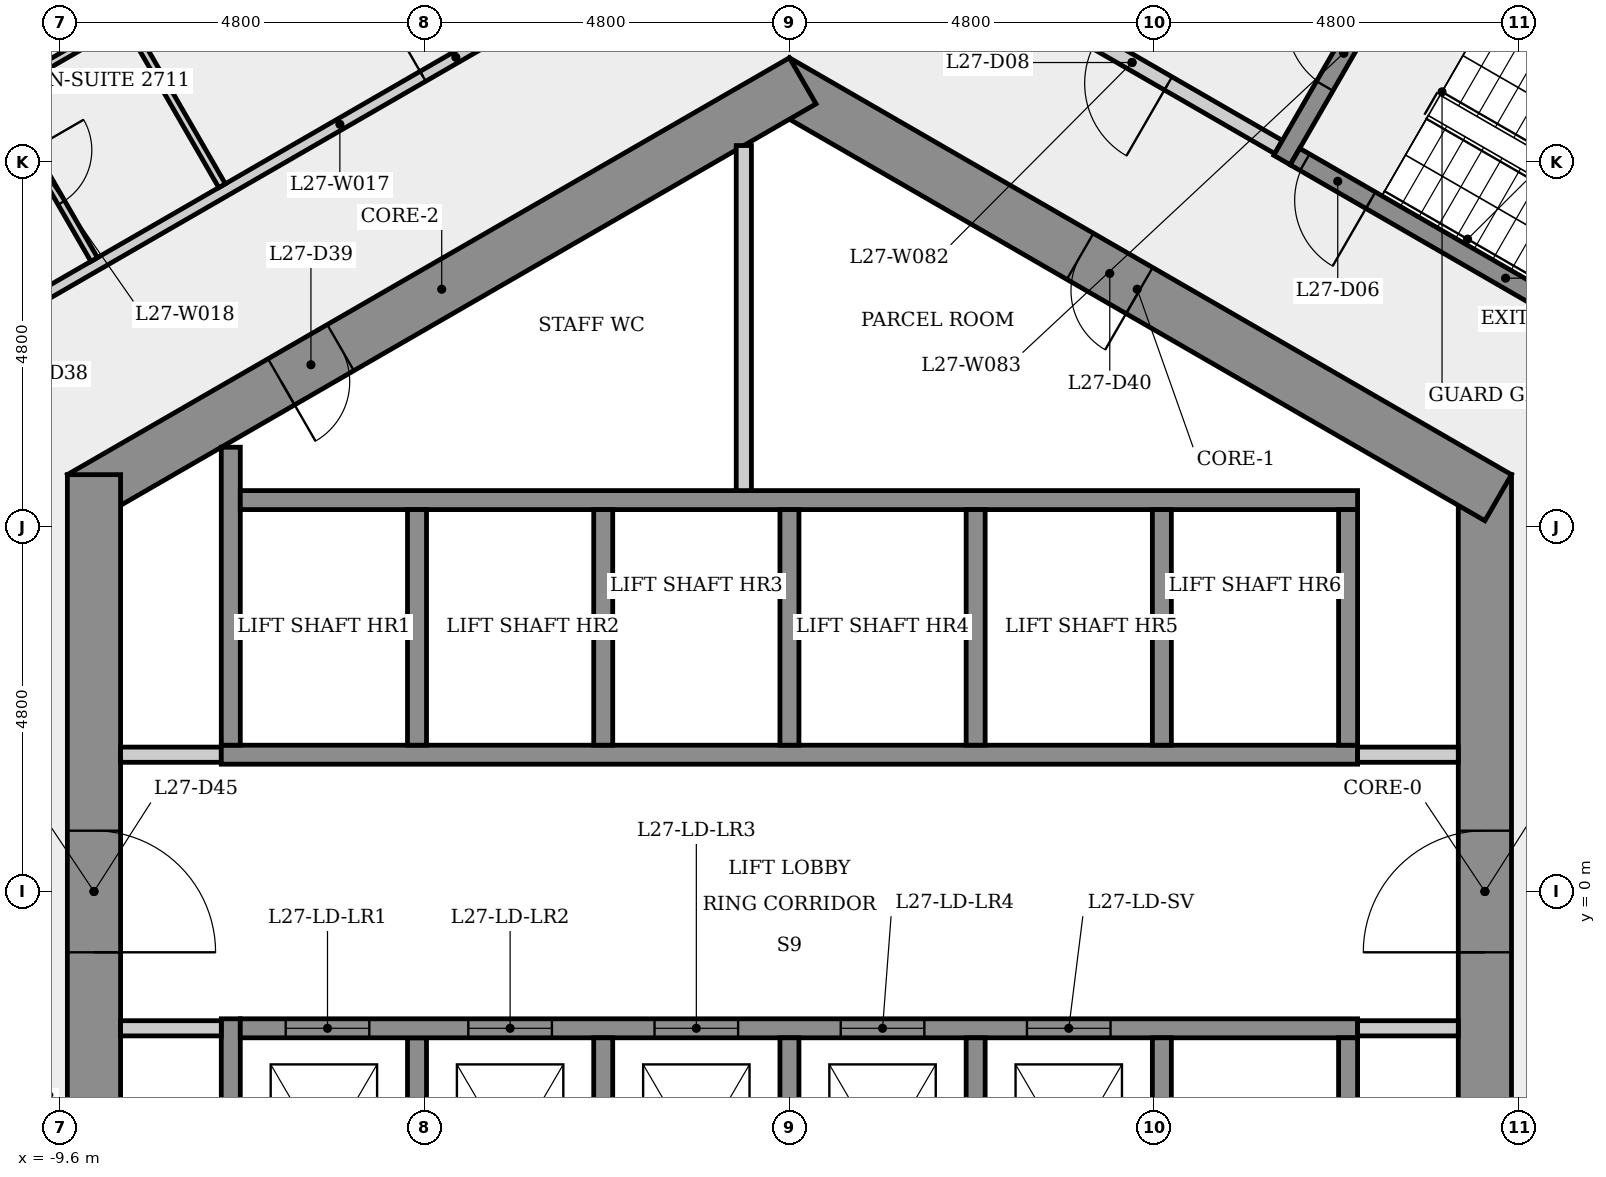
"""IFC4 building model, lengths in metres.
Left out: names, types, materials, properties, quantities, classifications, styles, units other than length and angle.
Written with IfcOpenShell. Run it as: python <this file> out.ifc"""

import sys

from ifc_helpers import new_model, si_unit, direction, frame, frame_2d, origin, place, context, subcontext, project, spatial, rectangle, extrude, element, fill, save


model = new_model("IFC4")
c1 = context("Model", 3, precision=1e-05, world=origin(), true_north=direction((0.0, 1.0)))
c2 = subcontext(c1, "Body", "Model", "MODEL_VIEW")
j1 = project(units=[si_unit("LENGTHUNIT", "METRE"), si_unit("PLANEANGLEUNIT", "RADIAN")], contexts=[c1])
p1 = place(None, origin())
s1 = spatial("IfcSite", under=j1, at=p1, CompositionType="ELEMENT")
p2 = place(p1, origin())
s2 = spatial("IfcBuilding", under=s1, at=p2, CompositionType="ELEMENT")
p3 = place(p2, frame((0.0, 0.0, 103.5)))
s3 = spatial("IfcBuildingStorey", under=s2, at=p3, CompositionType="ELEMENT", Elevation=103.5)
p4 = place(p3, frame((9.15, -5.485, 0.0), z_axis=(0.0, 0.0, 1.0), x_axis=(0.0, 1.0, 0.0)))
e1 = element("IfcWall", 1, at=p4, inside=s3, PredefinedType="SHEAR", context=c2, shape_type="SweptSolid", body=[
    extrude(rectangle(XDim=10.97, YDim=0.7, at=frame_2d((5.485, 0.0))), origin(), (0.0, 0.0, 1.0), 3.4),
])
p5 = place(p4, frame((4.685, 0.0, 0.0)))
e2 = element("IfcOpeningElement", 2, at=p5, cuts=e1, PredefinedType="OPENING", context=c2, shape_type="SweptSolid", body=[
    extrude(rectangle(XDim=1.6, YDim=2.1, at=frame_2d((0.8, 1.05))), frame((0.0, 0.36, 0.0), z_axis=(0.0, -1.0, 0.0), x_axis=(1.0, 0.0, 0.0)), (0.0, 0.0, 1.0), 0.72),
])
p6 = place(p3, frame((9.325, 5.182, 0.0), z_axis=(0.0, 0.0, 1.0), x_axis=(-0.866023993627, 0.500002442456, 0.0)))
e3 = element("IfcWall", 3, at=p6, inside=s3, PredefinedType="SHEAR", context=c2, shape_type="SweptSolid", body=[
    extrude(rectangle(XDim=10.97, YDim=0.7, at=frame_2d((5.485, 0.0))), origin(), (0.0, 0.0, 1.0), 3.4),
])
p7 = place(p6, frame((5.451, 0.0, 0.0)))
e4 = element("IfcOpeningElement", 4, at=p7, cuts=e3, PredefinedType="OPENING", context=c2, shape_type="SweptSolid", body=[
    extrude(rectangle(XDim=0.9, YDim=2.1, at=frame_2d((0.45, 1.05))), frame((0.0, 0.36, 0.0), z_axis=(0.0, -1.0, 0.0), x_axis=(1.0, 0.0, 0.0)), (0.0, 0.0, 1.0), 0.72),
])
p8 = place(p3, frame((0.175, 10.667, 0.0), z_axis=(0.0, 0.0, 1.0), x_axis=(-0.866023993627, -0.500002442456, 0.0)))
e5 = element("IfcWall", 5, at=p8, inside=s3, PredefinedType="SHEAR", context=c2, shape_type="SweptSolid", body=[
    extrude(rectangle(XDim=10.97, YDim=0.7, at=frame_2d((5.485, 0.0))), origin(), (0.0, 0.0, 1.0), 3.4),
])
p9 = place(p8, frame((7.021, 0.0, 0.0)))
e6 = element("IfcOpeningElement", 6, at=p9, cuts=e5, PredefinedType="OPENING", context=c2, shape_type="SweptSolid", body=[
    extrude(rectangle(XDim=0.9, YDim=2.1, at=frame_2d((0.45, 1.05))), frame((0.0, 0.36, 0.0), z_axis=(0.0, -1.0, 0.0), x_axis=(1.0, 0.0, 0.0)), (0.0, 0.0, 1.0), 0.72),
])
p10 = place(p3, frame((-9.15, 5.485, 0.0), z_axis=(0.0, 0.0, 1.0), x_axis=(0.0, -1.0, 0.0)))
e7 = element("IfcWall", 7, at=p10, inside=s3, PredefinedType="SHEAR", context=c2, shape_type="SweptSolid", body=[
    extrude(rectangle(XDim=10.97, YDim=0.7, at=frame_2d((5.485, 0.0))), origin(), (0.0, 0.0, 1.0), 3.4),
])
p11 = place(p10, frame((4.685, 0.0, 0.0)))
e8 = element("IfcOpeningElement", 8, at=p11, cuts=e7, PredefinedType="OPENING", context=c2, shape_type="SweptSolid", body=[
    extrude(rectangle(XDim=1.6, YDim=2.1, at=frame_2d((0.8, 1.05))), frame((0.0, 0.36, 0.0), z_axis=(0.0, -1.0, 0.0), x_axis=(1.0, 0.0, 0.0)), (0.0, 0.0, 1.0), 0.72),
])
p12 = place(p3, frame((-10.517, 7.438, 0.0), z_axis=(0.0, 0.0, 1.0), x_axis=(0.866032192358, 0.499988241661, 0.0)))
e9 = element("IfcWall", 9, at=p12, inside=s3, PredefinedType="PARTITIONING", context=c2, shape_type="SweptSolid", body=[
    extrude(rectangle(XDim=10.628, YDim=0.15, at=frame_2d((5.314, 0.0))), origin(), (0.0, 0.0, 1.0), 3.05),
])
p13 = place(p12, frame((6.575, 0.0, 0.0)))
e10 = element("IfcOpeningElement", 10, at=p13, cuts=e9, PredefinedType="OPENING", context=c2, shape_type="SweptSolid", body=[
    extrude(rectangle(XDim=1.0, YDim=2.1, at=frame_2d((0.5, 1.05))), frame((0.0, 0.085, 0.0), z_axis=(0.0, -1.0, 0.0), x_axis=(1.0, 0.0, 0.0)), (0.0, 0.0, 1.0), 0.17),
])
p14 = place(p3, frame((-10.435, 10.545, 0.0), z_axis=(0.0, 0.0, 1.0), x_axis=(0.500034319456, -0.866005588531, 0.0)))
e11 = element("IfcWall", 11, at=p14, inside=s3, PredefinedType="PARTITIONING", context=c2, shape_type="SweptSolid", body=[
    extrude(rectangle(XDim=2.575, YDim=0.1, at=frame_2d((1.288, 0.0))), origin(), (0.0, 0.0, 1.0), 3.05),
])
p15 = place(p14, frame((0.913, 0.0, 0.0)))
e12 = element("IfcOpeningElement", 12, at=p15, cuts=e11, PredefinedType="OPENING", context=c2, shape_type="SweptSolid", body=[
    extrude(rectangle(XDim=0.8, YDim=2.1, at=frame_2d((0.4, 1.05))), frame((0.0, 0.06, 0.0), z_axis=(0.0, -1.0, 0.0), x_axis=(1.0, 0.0, 0.0)), (0.0, 0.0, 1.0), 0.12),
])
p16 = place(p3, frame((-8.8, 1.8, 0.0), z_axis=(0.0, 0.0, 1.0), x_axis=(1.0, 0.0, 0.0)))
e13 = element("IfcWall", 13, at=p16, inside=s3, PredefinedType="PARTITIONING", context=c2, shape_type="SweptSolid", body=[
    extrude(rectangle(XDim=1.325, YDim=0.2, at=frame_2d((0.663, 0.0))), origin(), (0.0, 0.0, 1.0), 3.05),
])
p17 = place(p3, frame((-8.771, 11.448, 0.0), z_axis=(0.0, 0.0, 1.0), x_axis=(-0.866033360935, -0.499986217557, 0.0)))
e14 = element("IfcWall", 14, at=p17, inside=s3, PredefinedType="PARTITIONING", context=c2, shape_type="SweptSolid", body=[
    extrude(rectangle(XDim=1.843, YDim=0.1, at=frame_2d((0.921, 0.0))), origin(), (0.0, 0.0, 1.0), 3.05),
])
p18 = place(p3, frame((-11.32, 15.964, 0.0), z_axis=(0.0, 0.0, 1.0), x_axis=(0.499997453958, -0.866026873738, 0.0)))
e15 = element("IfcWall", 15, at=p18, inside=s3, PredefinedType="PARTITIONING", context=c2, shape_type="SweptSolid", body=[
    extrude(rectangle(XDim=7.71, YDim=0.1, at=frame_2d((3.855, 0.0))), origin(), (0.0, 0.0, 1.0), 3.05),
])
p19 = place(p3, frame((-7.475, 1.8, 0.0), z_axis=(0.0, 0.0, 1.0), x_axis=(1.0, 0.0, 0.0)))
e16 = element("IfcWall", 16, at=p19, inside=s3, PredefinedType="SHEAR", context=c2, shape_type="SweptSolid", body=[
    extrude(rectangle(XDim=14.95, YDim=0.25, at=frame_2d((7.475, 0.0))), origin(), (0.0, 0.0, 1.0), 3.05),
])
p20 = place(p3, frame((-7.35, -5.846, 0.0), z_axis=(0.0, 0.0, 1.0), x_axis=(0.0, 1.0, 0.0)))
e17 = element("IfcWall", 17, at=p20, inside=s3, PredefinedType="SHEAR", context=c2, shape_type="SweptSolid", body=[
    extrude(rectangle(XDim=4.171, YDim=0.25, at=frame_2d((2.085, 0.0))), origin(), (0.0, 0.0, 1.0), 3.05),
])
p21 = place(p3, frame((-7.35, 1.925, 0.0), z_axis=(0.0, 0.0, 1.0), x_axis=(0.0, 1.0, 0.0)))
e18 = element("IfcWall", 18, at=p21, inside=s3, PredefinedType="SHEAR", context=c2, shape_type="SweptSolid", body=[
    extrude(rectangle(XDim=3.921, YDim=0.25, at=frame_2d((1.96, 0.0))), origin(), (0.0, 0.0, 1.0), 3.05),
])
p22 = place(p3, frame((-7.225, 5.15, 0.0), z_axis=(0.0, 0.0, 1.0), x_axis=(1.0, 0.0, 0.0)))
e19 = element("IfcWall", 19, at=p22, inside=s3, PredefinedType="SHEAR", context=c2, shape_type="SweptSolid", body=[
    extrude(rectangle(XDim=14.7, YDim=0.25, at=frame_2d((7.35, 0.0))), origin(), (0.0, 0.0, 1.0), 3.05),
])
p23 = place(p3, frame((-7.475, -1.8, 0.0), z_axis=(0.0, 0.0, 1.0), x_axis=(-1.0, 0.0, 0.0)))
e20 = element("IfcWall", 20, at=p23, inside=s3, PredefinedType="PARTITIONING", context=c2, shape_type="SweptSolid", body=[
    extrude(rectangle(XDim=1.325, YDim=0.2, at=frame_2d((0.663, 0.0))), origin(), (0.0, 0.0, 1.0), 3.05),
])
for number, where, z_axis, x_axis in (
    (21, (-4.9, -1.925, 0.0), (0.0, 0.0, 1.0), (0.0, -1.0, 0.0)),
    (22, (-4.9, 5.025, 0.0), (0.0, 0.0, 1.0), (0.0, -1.0, 0.0)),
):
    element("IfcWall", number, at=place(p3, frame(where, z_axis=z_axis, x_axis=x_axis)), inside=s3, PredefinedType="SHEAR", context=c2, shape_type="SweptSolid", body=[
        extrude(rectangle(XDim=3.1, YDim=0.25, at=frame_2d((1.55, 0.0))), origin(), (0.0, 0.0, 1.0), 3.4),
    ])
p24 = place(p3, frame((-7.225, -1.8, 0.0), z_axis=(0.0, 0.0, 1.0), x_axis=(1.0, 0.0, 0.0)))
e23 = element("IfcWall", 23, at=p24, inside=s3, PredefinedType="SHEAR", context=c2, shape_type="SweptSolid", body=[
    extrude(rectangle(XDim=14.7, YDim=0.25, at=frame_2d((7.35, 0.0))), origin(), (0.0, 0.0, 1.0), 3.05),
])
p25 = place(p24, frame((0.597, 0.0, 0.0)))
e24 = element("IfcOpeningElement", 24, at=p25, cuts=e23, PredefinedType="OPENING", context=c2, shape_type="SweptSolid", body=[
    extrude(rectangle(XDim=1.1, YDim=2.1, at=frame_2d((0.55, 1.05))), frame((0.0, 0.135, 0.0), z_axis=(0.0, -1.0, 0.0), x_axis=(1.0, 0.0, 0.0)), (0.0, 0.0, 1.0), 0.27),
])
p26 = place(p24, frame((3.0, 0.0, 0.0)))
e25 = element("IfcOpeningElement", 25, at=p26, cuts=e23, PredefinedType="OPENING", context=c2, shape_type="SweptSolid", body=[
    extrude(rectangle(XDim=1.1, YDim=2.1, at=frame_2d((0.55, 1.05))), frame((0.0, 0.135, 0.0), z_axis=(0.0, -1.0, 0.0), x_axis=(1.0, 0.0, 0.0)), (0.0, 0.0, 1.0), 0.27),
])
p27 = place(p24, frame((5.45, 0.0, 0.0)))
e26 = element("IfcOpeningElement", 26, at=p27, cuts=e23, PredefinedType="OPENING", context=c2, shape_type="SweptSolid", body=[
    extrude(rectangle(XDim=1.1, YDim=2.1, at=frame_2d((0.55, 1.05))), frame((0.0, 0.135, 0.0), z_axis=(0.0, -1.0, 0.0), x_axis=(1.0, 0.0, 0.0)), (0.0, 0.0, 1.0), 0.27),
])
p28 = place(p24, frame((7.9, 0.0, 0.0)))
e27 = element("IfcOpeningElement", 27, at=p28, cuts=e23, PredefinedType="OPENING", context=c2, shape_type="SweptSolid", body=[
    extrude(rectangle(XDim=1.1, YDim=2.1, at=frame_2d((0.55, 1.05))), frame((0.0, 0.135, 0.0), z_axis=(0.0, -1.0, 0.0), x_axis=(1.0, 0.0, 0.0)), (0.0, 0.0, 1.0), 0.27),
])
p29 = place(p24, frame((10.35, 0.0, 0.0)))
e28 = element("IfcOpeningElement", 28, at=p29, cuts=e23, PredefinedType="OPENING", context=c2, shape_type="SweptSolid", body=[
    extrude(rectangle(XDim=1.1, YDim=2.1, at=frame_2d((0.55, 1.05))), frame((0.0, 0.135, 0.0), z_axis=(0.0, -1.0, 0.0), x_axis=(1.0, 0.0, 0.0)), (0.0, 0.0, 1.0), 0.27),
])
for number, where, z_axis, x_axis in (
    (29, (-2.45, -1.925, 0.0), (0.0, 0.0, 1.0), (0.0, -1.0, 0.0)),
    (30, (-2.45, 5.025, 0.0), (0.0, 0.0, 1.0), (0.0, -1.0, 0.0)),
):
    element("IfcWall", number, at=place(p3, frame(where, z_axis=z_axis, x_axis=x_axis)), inside=s3, PredefinedType="SHEAR", context=c2, shape_type="SweptSolid", body=[
        extrude(rectangle(XDim=3.1, YDim=0.25, at=frame_2d((1.55, 0.0))), origin(), (0.0, 0.0, 1.0), 3.4),
    ])
p30 = place(p3, frame((-0.6, 9.815, 0.0), z_axis=(0.0, 0.0, 1.0), x_axis=(0.0, -1.0, 0.0)))
e31 = element("IfcWall", 31, at=p30, inside=s3, PredefinedType="PARTITIONING", context=c2, shape_type="SweptSolid", body=[
    extrude(rectangle(XDim=4.54, YDim=0.2, at=frame_2d((2.27, 0.0))), origin(), (0.0, 0.0, 1.0), 3.05),
])
for number, where, z_axis, x_axis in (
    (32, (0.0, -1.925, 0.0), (0.0, 0.0, 1.0), (0.0, -1.0, 0.0)),
    (33, (0.0, 5.025, 0.0), (0.0, 0.0, 1.0), (0.0, -1.0, 0.0)),
    (34, (2.45, -1.925, 0.0), (0.0, 0.0, 1.0), (0.0, -1.0, 0.0)),
    (35, (2.45, 5.025, 0.0), (0.0, 0.0, 1.0), (0.0, -1.0, 0.0)),
    (36, (4.9, -1.925, 0.0), (0.0, 0.0, 1.0), (0.0, -1.0, 0.0)),
    (37, (4.9, 5.025, 0.0), (0.0, 0.0, 1.0), (0.0, -1.0, 0.0)),
):
    element("IfcWall", number, at=place(p3, frame(where, z_axis=z_axis, x_axis=x_axis)), inside=s3, PredefinedType="SHEAR", context=c2, shape_type="SweptSolid", body=[
        extrude(rectangle(XDim=3.1, YDim=0.25, at=frame_2d((1.55, 0.0))), origin(), (0.0, 0.0, 1.0), 3.4),
    ])
p31 = place(p3, frame((6.435, 9.795, 0.0), z_axis=(0.0, 0.0, 1.0), x_axis=(-0.866012907634, 0.500021643343, 0.0)))
e38 = element("IfcWall", 38, at=p31, inside=s3, PredefinedType="PARTITIONING", context=c2, shape_type="SweptSolid", body=[
    extrude(rectangle(XDim=4.45, YDim=0.2, at=frame_2d((2.225, 0.0))), origin(), (0.0, 0.0, 1.0), 3.05),
])
p32 = place(p31, frame((1.675, 0.0, 0.0)))
e39 = element("IfcOpeningElement", 39, at=p32, cuts=e38, PredefinedType="OPENING", context=c2, shape_type="SweptSolid", body=[
    extrude(rectangle(XDim=1.1, YDim=2.1, at=frame_2d((0.55, 1.05))), frame((0.0, 0.11, 0.0), z_axis=(0.0, -1.0, 0.0), x_axis=(1.0, 0.0, 0.0)), (0.0, 0.0, 1.0), 0.22),
])
p33 = place(p3, frame((6.48, 9.624, 0.0), z_axis=(0.0, 0.0, 1.0), x_axis=(0.500017246033, 0.866015446554, 0.0)))
e40 = element("IfcWall", 40, at=p33, inside=s3, PredefinedType="SHEAR", context=c2, shape_type="SweptSolid", body=[
    extrude(rectangle(XDim=3.25, YDim=0.25, at=frame_2d((1.625, 0.0))), origin(), (0.0, 0.0, 1.0), 3.05),
])
p34 = place(p33, frame((1.125, 0.0, 0.0)))
e41 = element("IfcOpeningElement", 41, at=p34, cuts=e40, PredefinedType="OPENING", context=c2, shape_type="SweptSolid", body=[
    extrude(rectangle(XDim=1.0, YDim=2.1, at=frame_2d((0.5, 1.05))), frame((0.0, 0.135, 0.0), z_axis=(0.0, -1.0, 0.0), x_axis=(1.0, 0.0, 0.0)), (0.0, 0.0, 1.0), 0.27),
])
p35 = place(p3, frame((7.475, 1.8, 0.0), z_axis=(0.0, 0.0, 1.0), x_axis=(1.0, 0.0, 0.0)))
e42 = element("IfcWall", 42, at=p35, inside=s3, PredefinedType="PARTITIONING", context=c2, shape_type="SweptSolid", body=[
    extrude(rectangle(XDim=1.325, YDim=0.2, at=frame_2d((0.663, 0.0))), origin(), (0.0, 0.0, 1.0), 3.05),
])
for number, where, z_axis, x_axis in (
    (43, (7.35, -1.925, 0.0), (0.0, 0.0, 1.0), (0.0, -1.0, 0.0)),
    (44, (7.35, 5.025, 0.0), (0.0, 0.0, 1.0), (0.0, -1.0, 0.0)),
):
    element("IfcWall", number, at=place(p3, frame(where, z_axis=z_axis, x_axis=x_axis)), inside=s3, PredefinedType="SHEAR", context=c2, shape_type="SweptSolid", body=[
        extrude(rectangle(XDim=3.1, YDim=0.25, at=frame_2d((1.55, 0.0))), origin(), (0.0, 0.0, 1.0), 3.4),
    ])
p36 = place(p3, frame((8.151, 12.268, 0.0), z_axis=(0.0, 0.0, 1.0), x_axis=(0.866025499775, -0.499999833739, 0.0)))
e45 = element("IfcWall", 45, at=p36, inside=s3, PredefinedType="SHEAR", context=c2, shape_type="SweptSolid", body=[
    extrude(rectangle(XDim=6.4, YDim=0.25, at=frame_2d((3.2, 0.0))), origin(), (0.0, 0.0, 1.0), 3.05),
])
p37 = place(p3, frame((8.8, -1.8, 0.0), z_axis=(0.0, 0.0, 1.0), x_axis=(-1.0, 0.0, 0.0)))
e46 = element("IfcWall", 46, at=p37, inside=s3, PredefinedType="PARTITIONING", context=c2, shape_type="SweptSolid", body=[
    extrude(rectangle(XDim=1.325, YDim=0.2, at=frame_2d((0.663, 0.0))), origin(), (0.0, 0.0, 1.0), 3.05),
])
p38 = place(p3, frame((12.194, 6.47, 0.0), z_axis=(0.0, 0.0, 1.0), x_axis=(-0.866025499775, 0.499999833739, 0.0)))
e47 = element("IfcWall", 47, at=p38, inside=s3, PredefinedType="SHEAR", context=c2, shape_type="SweptSolid", body=[
    extrude(rectangle(XDim=6.4, YDim=0.25, at=frame_2d((3.2, 0.0))), origin(), (0.0, 0.0, 1.0), 3.05),
])
p39 = place(p38, frame((5.25, 0.0, 0.0)))
e48 = element("IfcOpeningElement", 48, at=p39, cuts=e47, PredefinedType="OPENING", context=c2, shape_type="SweptSolid", body=[
    extrude(rectangle(XDim=1.0, YDim=2.1, at=frame_2d((0.5, 1.05))), frame((0.0, 0.135, 0.0), z_axis=(0.0, -1.0, 0.0), x_axis=(1.0, 0.0, 0.0)), (0.0, 0.0, 1.0), 0.27),
])
p40 = place(p25, origin())
e49 = element("IfcDoor", 49, at=p40, inside=s3, OperationType="SLIDING_TO_LEFT", PredefinedType="DOOR", context=c2, shape_type="SweptSolid", body=[
    extrude(rectangle(XDim=1.1, YDim=2.1, at=frame_2d((0.55, 1.05))), frame((0.0, 0.025, 0.0), z_axis=(0.0, -1.0, 0.0), x_axis=(1.0, 0.0, 0.0)), (0.0, 0.0, 1.0), 0.05),
])
fill(e24, e49)
p41 = place(p26, origin())
e50 = element("IfcDoor", 50, at=p41, inside=s3, OperationType="SLIDING_TO_LEFT", PredefinedType="DOOR", context=c2, shape_type="SweptSolid", body=[
    extrude(rectangle(XDim=1.1, YDim=2.1, at=frame_2d((0.55, 1.05))), frame((0.0, 0.025, 0.0), z_axis=(0.0, -1.0, 0.0), x_axis=(1.0, 0.0, 0.0)), (0.0, 0.0, 1.0), 0.05),
])
fill(e25, e50)
p42 = place(p27, origin())
e51 = element("IfcDoor", 51, at=p42, inside=s3, OperationType="SLIDING_TO_LEFT", PredefinedType="DOOR", context=c2, shape_type="SweptSolid", body=[
    extrude(rectangle(XDim=1.1, YDim=2.1, at=frame_2d((0.55, 1.05))), frame((0.0, 0.025, 0.0), z_axis=(0.0, -1.0, 0.0), x_axis=(1.0, 0.0, 0.0)), (0.0, 0.0, 1.0), 0.05),
])
fill(e26, e51)
p43 = place(p28, origin())
e52 = element("IfcDoor", 52, at=p43, inside=s3, OperationType="SLIDING_TO_LEFT", PredefinedType="DOOR", context=c2, shape_type="SweptSolid", body=[
    extrude(rectangle(XDim=1.1, YDim=2.1, at=frame_2d((0.55, 1.05))), frame((0.0, 0.025, 0.0), z_axis=(0.0, -1.0, 0.0), x_axis=(1.0, 0.0, 0.0)), (0.0, 0.0, 1.0), 0.05),
])
fill(e27, e52)
p44 = place(p29, origin())
e53 = element("IfcDoor", 53, at=p44, inside=s3, OperationType="SLIDING_TO_LEFT", PredefinedType="DOOR", context=c2, shape_type="SweptSolid", body=[
    extrude(rectangle(XDim=1.1, YDim=2.1, at=frame_2d((0.55, 1.05))), frame((0.0, 0.025, 0.0), z_axis=(0.0, -1.0, 0.0), x_axis=(1.0, 0.0, 0.0)), (0.0, 0.0, 1.0), 0.05),
])
fill(e28, e53)
p45 = place(p39, origin())
e54 = element("IfcDoor", 54, at=p45, inside=s3, OperationType="SINGLE_SWING_LEFT", PredefinedType="DOOR", context=c2, shape_type="SweptSolid", body=[
    extrude(rectangle(XDim=1.0, YDim=2.1, at=frame_2d((0.5, 1.05))), frame((0.0, 0.025, 0.0), z_axis=(0.0, -1.0, 0.0), x_axis=(1.0, 0.0, 0.0)), (0.0, 0.0, 1.0), 0.05),
])
fill(e48, e54)
p46 = place(p34, origin())
e55 = element("IfcDoor", 55, at=p46, inside=s3, OperationType="SINGLE_SWING_RIGHT", PredefinedType="DOOR", context=c2, shape_type="SweptSolid", body=[
    extrude(rectangle(XDim=1.0, YDim=2.1, at=frame_2d((0.5, 1.05))), frame((0.0, 0.025, 0.0), z_axis=(0.0, -1.0, 0.0), x_axis=(1.0, 0.0, 0.0)), (0.0, 0.0, 1.0), 0.05),
])
fill(e41, e55)
p47 = place(p32, origin())
e56 = element("IfcDoor", 56, at=p47, inside=s3, OperationType="SINGLE_SWING_LEFT", PredefinedType="DOOR", context=c2, shape_type="SweptSolid", body=[
    extrude(rectangle(XDim=1.1, YDim=2.1, at=frame_2d((0.55, 1.05))), frame((0.0, 0.025, 0.0), z_axis=(0.0, -1.0, 0.0), x_axis=(1.0, 0.0, 0.0)), (0.0, 0.0, 1.0), 0.05),
])
fill(e39, e56)
p48 = place(p13, origin())
e57 = element("IfcDoor", 57, at=p48, inside=s3, OperationType="SINGLE_SWING_LEFT", PredefinedType="DOOR", context=c2, shape_type="SweptSolid", body=[
    extrude(rectangle(XDim=1.0, YDim=2.1, at=frame_2d((0.5, 1.05))), frame((0.0, 0.025, 0.0), z_axis=(0.0, -1.0, 0.0), x_axis=(1.0, 0.0, 0.0)), (0.0, 0.0, 1.0), 0.05),
])
fill(e10, e57)
p49 = place(p15, origin())
e58 = element("IfcDoor", 58, at=p49, inside=s3, OperationType="SINGLE_SWING_LEFT", PredefinedType="DOOR", context=c2, shape_type="SweptSolid", body=[
    extrude(rectangle(XDim=0.8, YDim=2.1, at=frame_2d((0.4, 1.05))), frame((0.0, 0.025, 0.0), z_axis=(0.0, -1.0, 0.0), x_axis=(1.0, 0.0, 0.0)), (0.0, 0.0, 1.0), 0.05),
])
fill(e12, e58)
p50 = place(p9, origin())
e59 = element("IfcDoor", 59, at=p50, inside=s3, OperationType="SINGLE_SWING_RIGHT", PredefinedType="DOOR", context=c2, shape_type="SweptSolid", body=[
    extrude(rectangle(XDim=0.9, YDim=2.1, at=frame_2d((0.45, 1.05))), frame((0.0, 0.025, 0.0), z_axis=(0.0, -1.0, 0.0), x_axis=(1.0, 0.0, 0.0)), (0.0, 0.0, 1.0), 0.05),
])
fill(e6, e59)
p51 = place(p7, origin())
e60 = element("IfcDoor", 60, at=p51, inside=s3, OperationType="SINGLE_SWING_LEFT", PredefinedType="DOOR", context=c2, shape_type="SweptSolid", body=[
    extrude(rectangle(XDim=0.9, YDim=2.1, at=frame_2d((0.45, 1.05))), frame((0.0, 0.025, 0.0), z_axis=(0.0, -1.0, 0.0), x_axis=(1.0, 0.0, 0.0)), (0.0, 0.0, 1.0), 0.05),
])
fill(e4, e60)
p52 = place(p5, origin())
e61 = element("IfcDoor", 61, at=p52, inside=s3, OperationType="SINGLE_SWING_LEFT", PredefinedType="DOOR", context=c2, shape_type="SweptSolid", body=[
    extrude(rectangle(XDim=1.6, YDim=2.1, at=frame_2d((0.8, 1.05))), frame((0.0, 0.025, 0.0), z_axis=(0.0, -1.0, 0.0), x_axis=(1.0, 0.0, 0.0)), (0.0, 0.0, 1.0), 0.05),
])
fill(e2, e61)
p53 = place(p11, origin())
e62 = element("IfcDoor", 62, at=p53, inside=s3, OperationType="SINGLE_SWING_RIGHT", PredefinedType="DOOR", context=c2, shape_type="SweptSolid", body=[
    extrude(rectangle(XDim=1.6, YDim=2.1, at=frame_2d((0.8, 1.05))), frame((0.0, 0.025, 0.0), z_axis=(0.0, -1.0, 0.0), x_axis=(1.0, 0.0, 0.0)), (0.0, 0.0, 1.0), 0.05),
])
fill(e8, e62)
save(model, sys.argv[1])
